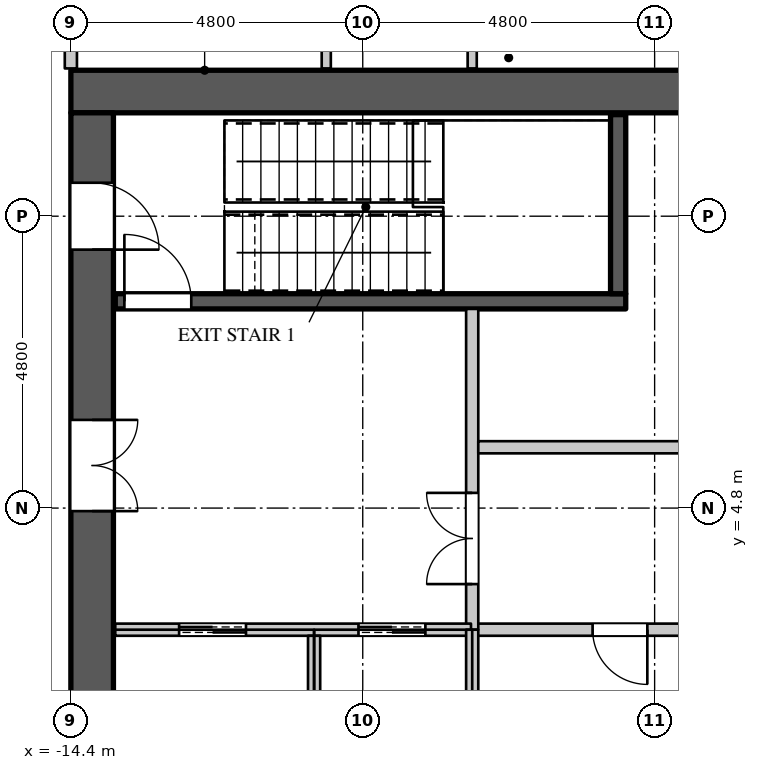
"""IFC4 building model, lengths in metres.
Left out: names, types, materials, properties, quantities, classifications, styles, units other than length and angle.
Written with IfcOpenShell. Run it as: python <this file> out.ifc"""

import sys

from ifc_helpers import new_model, si_unit, direction, frame, frame_2d, origin, place, context, subcontext, project, spatial, rectangle, extrude, element, fill, save


model = new_model("IFC4")
c1 = context("Model", 3, precision=1e-05, world=origin(), true_north=direction((0.0, 1.0)))
c2 = subcontext(c1, "Body", "Model", "MODEL_VIEW")
j1 = project(units=[si_unit("LENGTHUNIT", "METRE"), si_unit("PLANEANGLEUNIT", "RADIAN")], contexts=[c1])
p1 = place(None, origin())
s1 = spatial("IfcSite", under=j1, at=p1, CompositionType="ELEMENT")
p2 = place(p1, origin())
s2 = spatial("IfcBuilding", under=s1, at=p2, CompositionType="ELEMENT")
p3 = place(p2, frame((0.0, 0.0, 174.9)))
s3 = spatial("IfcBuildingStorey", under=s2, at=p3, CompositionType="ELEMENT", Elevation=174.9)
p4 = place(p3, frame((-14.4, 11.65, 0.0), z_axis=(0.0, 0.0, 1.0), x_axis=(1.0, 0.0, 0.0)))
e1 = element("IfcWall", 1, at=p4, inside=s3, PredefinedType="SHEAR", context=c2, shape_type="SweptSolid", body=[
    extrude(rectangle(XDim=28.8, YDim=0.7, at=frame_2d((14.4, 0.0))), origin(), (0.0, 0.0, 1.0), 4.2),
])
p5 = place(p3, frame((-14.05, -11.3, 0.0), z_axis=(0.0, 0.0, 1.0), x_axis=(0.0, 1.0, 0.0)))
e2 = element("IfcWall", 2, at=p5, inside=s3, PredefinedType="SHEAR", context=c2, shape_type="SweptSolid", body=[
    extrude(rectangle(XDim=22.6, YDim=0.7, at=frame_2d((11.3, 0.0))), origin(), (0.0, 0.0, 1.0), 4.2),
])
p6 = place(p5, frame((20.35, 0.0, 0.0)))
e3 = element("IfcOpeningElement", 3, at=p6, cuts=e2, PredefinedType="OPENING", context=c2, shape_type="SweptSolid", body=[
    extrude(rectangle(XDim=1.1, YDim=2.2, at=frame_2d((0.55, 1.1))), frame((0.0, 0.36, 0.0), z_axis=(0.0, -1.0, 0.0), x_axis=(1.0, 0.0, 0.0)), (0.0, 0.0, 1.0), 0.72),
])
p7 = place(p5, frame((1.15, 0.0, 0.0)))
e4 = element("IfcOpeningElement", 4, at=p7, cuts=e2, PredefinedType="OPENING", context=c2, shape_type="SweptSolid", body=[
    extrude(rectangle(XDim=1.1, YDim=2.2, at=frame_2d((0.55, 1.1))), frame((0.0, 0.36, 0.0), z_axis=(0.0, -1.0, 0.0), x_axis=(1.0, 0.0, 0.0)), (0.0, 0.0, 1.0), 0.72),
])
p8 = place(p5, frame((16.05, 0.0, 0.0)))
e5 = element("IfcOpeningElement", 5, at=p8, cuts=e2, PredefinedType="OPENING", context=c2, shape_type="SweptSolid", body=[
    extrude(rectangle(XDim=1.5, YDim=2.4, at=frame_2d((0.75, 1.2))), frame((0.0, 0.36, 0.0), z_axis=(0.0, -1.0, 0.0), x_axis=(1.0, 0.0, 0.0)), (0.0, 0.0, 1.0), 0.72),
])
p9 = place(p5, frame((5.05, 0.0, 0.0)))
e6 = element("IfcOpeningElement", 6, at=p9, cuts=e2, PredefinedType="OPENING", context=c2, shape_type="SweptSolid", body=[
    extrude(rectangle(XDim=1.5, YDim=2.4, at=frame_2d((0.75, 1.2))), frame((0.0, 0.36, 0.0), z_axis=(0.0, -1.0, 0.0), x_axis=(1.0, 0.0, 0.0)), (0.0, 0.0, 1.0), 0.72),
])
p10 = place(p3, frame((-14.4, 12.03, 0.0), z_axis=(0.0, 0.0, 1.0), x_axis=(0.0, 1.0, 0.0)))
e7 = element("IfcWall", 7, at=p10, inside=s3, PredefinedType="PARTITIONING", context=c2, shape_type="SweptSolid", body=[
    extrude(rectangle(XDim=2.27, YDim=0.2, at=frame_2d((1.135, 0.0))), origin(), (0.0, 0.0, 1.0), 3.95),
])
p11 = place(p3, frame((-7.82, 2.8, 0.0), z_axis=(0.0, 0.0, 1.0), x_axis=(1.0, 0.0, 0.0)))
e8 = element("IfcWall", 8, at=p11, inside=s3, PredefinedType="PARTITIONING", context=c2, shape_type="SweptSolid", body=[
    extrude(rectangle(XDim=18.24, YDim=0.2, at=frame_2d((9.12, 0.0))), origin(), (0.0, 0.0, 1.0), 3.95),
])
p12 = place(p11, frame((2.0, 0.0, 0.0)))
e9 = element("IfcOpeningElement", 9, at=p12, cuts=e8, PredefinedType="OPENING", context=c2, shape_type="SweptSolid", body=[
    extrude(rectangle(XDim=0.9, YDim=2.2, at=frame_2d((0.45, 1.1))), frame((0.0, 0.11, 0.0), z_axis=(0.0, -1.0, 0.0), x_axis=(1.0, 0.0, 0.0)), (0.0, 0.0, 1.0), 0.22),
])
p13 = place(p11, frame((6.1, 0.0, 0.0)))
e10 = element("IfcOpeningElement", 10, at=p13, cuts=e8, PredefinedType="OPENING", context=c2, shape_type="SweptSolid", body=[
    extrude(rectangle(XDim=0.9, YDim=2.2, at=frame_2d((0.45, 1.1))), frame((0.0, 0.11, 0.0), z_axis=(0.0, -1.0, 0.0), x_axis=(1.0, 0.0, 0.0)), (0.0, 0.0, 1.0), 0.22),
])
p14 = place(p11, frame((9.35, 0.0, 0.0)))
e11 = element("IfcOpeningElement", 11, at=p14, cuts=e8, PredefinedType="OPENING", context=c2, shape_type="SweptSolid", body=[
    extrude(rectangle(XDim=0.9, YDim=2.2, at=frame_2d((0.45, 1.1))), frame((0.0, 0.11, 0.0), z_axis=(0.0, -1.0, 0.0), x_axis=(1.0, 0.0, 0.0)), (0.0, 0.0, 1.0), 0.22),
])
p15 = place(p11, frame((14.3, 0.0, 0.0)))
e12 = element("IfcOpeningElement", 12, at=p15, cuts=e8, PredefinedType="OPENING", context=c2, shape_type="SweptSolid", body=[
    extrude(rectangle(XDim=0.9, YDim=2.2, at=frame_2d((0.45, 1.1))), frame((0.0, 0.11, 0.0), z_axis=(0.0, -1.0, 0.0), x_axis=(1.0, 0.0, 0.0)), (0.0, 0.0, 1.0), 0.22),
])
p16 = place(p3, frame((-7.8, 2.8, 0.0), z_axis=(0.0, 0.0, 1.0), x_axis=(0.0, 1.0, 0.0)))
e13 = element("IfcWall", 13, at=p16, inside=s3, PredefinedType="PARTITIONING", context=c2, shape_type="SweptSolid", body=[
    extrude(rectangle(XDim=5.275, YDim=0.2, at=frame_2d((2.637, 0.0))), origin(), (0.0, 0.0, 1.0), 3.95),
])
p17 = place(p16, frame((0.75, 0.0, 0.0)))
e14 = element("IfcOpeningElement", 14, at=p17, cuts=e13, PredefinedType="OPENING", context=c2, shape_type="SweptSolid", body=[
    extrude(rectangle(XDim=1.5, YDim=2.4, at=frame_2d((0.75, 1.2))), frame((0.0, 0.11, 0.0), z_axis=(0.0, -1.0, 0.0), x_axis=(1.0, 0.0, 0.0)), (0.0, 0.0, 1.0), 0.22),
])
p18 = place(p3, frame((-7.7, 5.8, 0.0), z_axis=(0.0, 0.0, 1.0), x_axis=(1.0, 0.0, 0.0)))
e15 = element("IfcWall", 15, at=p18, inside=s3, PredefinedType="PARTITIONING", context=c2, shape_type="SweptSolid", body=[
    extrude(rectangle(XDim=11.52, YDim=0.2, at=frame_2d((5.76, 0.0))), origin(), (0.0, 0.0, 1.0), 3.95),
])
p19 = place(p18, frame((5.3, 0.0, 0.0)))
e16 = element("IfcOpeningElement", 16, at=p19, cuts=e15, PredefinedType="OPENING", context=c2, shape_type="SweptSolid", body=[
    extrude(rectangle(XDim=0.9, YDim=2.2, at=frame_2d((0.45, 1.1))), frame((0.0, 0.11, 0.0), z_axis=(0.0, -1.0, 0.0), x_axis=(1.0, 0.0, 0.0)), (0.0, 0.0, 1.0), 0.22),
])
p20 = place(p3, frame((-10.2, 12.03, 0.0), z_axis=(0.0, 0.0, 1.0), x_axis=(0.0, 1.0, 0.0)))
e17 = element("IfcWall", 17, at=p20, inside=s3, PredefinedType="PARTITIONING", context=c2, shape_type="SweptSolid", body=[
    extrude(rectangle(XDim=4.245, YDim=0.15, at=frame_2d((2.123, 0.0))), origin(), (0.0, 0.0, 1.0), 3.95),
])
p21 = place(p20, frame((1.6, 0.0, 0.0)))
e18 = element("IfcOpeningElement", 18, at=p21, cuts=e17, PredefinedType="OPENING", context=c2, shape_type="SweptSolid", body=[
    extrude(rectangle(XDim=0.95, YDim=2.2, at=frame_2d((0.475, 1.1))), frame((0.0, 0.085, 0.0), z_axis=(0.0, -1.0, 0.0), x_axis=(1.0, 0.0, 0.0)), (0.0, 0.0, 1.0), 0.17),
])
p22 = place(p3, frame((-7.8, 12.03, 0.0), z_axis=(0.0, 0.0, 1.0), x_axis=(0.0, 1.0, 0.0)))
e19 = element("IfcWall", 19, at=p22, inside=s3, PredefinedType="PARTITIONING", context=c2, shape_type="SweptSolid", body=[
    extrude(rectangle(XDim=4.695, YDim=0.15, at=frame_2d((2.348, 0.0))), origin(), (0.0, 0.0, 1.0), 3.95),
])
p23 = place(p3, frame((-13.67, 2.8, 0.0), z_axis=(0.0, 0.0, 1.0), x_axis=(1.0, 0.0, 0.0)))
e20 = element("IfcWall", 20, at=p23, inside=s3, PredefinedType="PARTITIONING", context=c2, shape_type="SweptSolid", body=[
    extrude(rectangle(XDim=5.85, YDim=0.2, at=frame_2d((2.925, 0.0))), origin(), (0.0, 0.0, 1.0), 3.95),
])
p24 = place(p23, frame((1.05, 0.0, 0.0)))
e21 = element("IfcOpeningElement", 21, at=p24, cuts=e20, PredefinedType="OPENING", context=c2, shape_type="SweptSolid", body=[
    extrude(rectangle(XDim=1.1, YDim=2.2, at=frame_2d((0.55, 1.1))), frame((0.0, 0.11, 0.0), z_axis=(0.0, -1.0, 0.0), x_axis=(1.0, 0.0, 0.0)), (0.0, 0.0, 1.0), 0.22),
])
p25 = place(p23, frame((4.0, 0.0, 0.0)))
e22 = element("IfcOpeningElement", 22, at=p25, cuts=e20, PredefinedType="OPENING", context=c2, shape_type="SweptSolid", body=[
    extrude(rectangle(XDim=1.1, YDim=2.2, at=frame_2d((0.55, 1.1))), frame((0.0, 0.11, 0.0), z_axis=(0.0, -1.0, 0.0), x_axis=(1.0, 0.0, 0.0)), (0.0, 0.0, 1.0), 0.22),
])
p26 = place(p3, frame((-10.4, 0.0, 0.0), z_axis=(0.0, 0.0, 1.0), x_axis=(0.0, 1.0, 0.0)))
e23 = element("IfcWall", 23, at=p26, inside=s3, PredefinedType="PARTITIONING", context=c2, shape_type="SweptSolid", body=[
    extrude(rectangle(XDim=2.7, YDim=0.2, at=frame_2d((1.35, 0.0))), origin(), (0.0, 0.0, 1.0), 3.95),
])
p27 = place(p3, frame((-7.8, 0.0, 0.0), z_axis=(0.0, 0.0, 1.0), x_axis=(0.0, 1.0, 0.0)))
e24 = element("IfcWall", 24, at=p27, inside=s3, PredefinedType="PARTITIONING", context=c2, shape_type="SweptSolid", body=[
    extrude(rectangle(XDim=2.8, YDim=0.2, at=frame_2d((1.4, 0.0))), origin(), (0.0, 0.0, 1.0), 3.95),
])
p28 = place(p3, frame((-13.67, 8.2, 0.0), z_axis=(0.0, 0.0, 1.0), x_axis=(1.0, 0.0, 0.0)))
e25 = element("IfcWall", 25, at=p28, inside=s3, PredefinedType="SHEAR", context=c2, shape_type="SweptSolid", body=[
    extrude(rectangle(XDim=8.395, YDim=0.25, at=frame_2d((4.198, 0.0))), origin(), (0.0, 0.0, 1.0), 3.95),
])
p29 = place(p28, frame((0.15, 0.0, 0.0)))
e26 = element("IfcOpeningElement", 26, at=p29, cuts=e25, PredefinedType="OPENING", context=c2, shape_type="SweptSolid", body=[
    extrude(rectangle(XDim=1.1, YDim=2.2, at=frame_2d((0.55, 1.1))), frame((0.0, 0.135, 0.0), z_axis=(0.0, -1.0, 0.0), x_axis=(1.0, 0.0, 0.0)), (0.0, 0.0, 1.0), 0.27),
])
p30 = place(p3, frame((-5.4, 8.325, 0.0), z_axis=(0.0, 0.0, 1.0), x_axis=(0.0, 1.0, 0.0)))
e27 = element("IfcWall", 27, at=p30, inside=s3, PredefinedType="SHEAR", context=c2, shape_type="SweptSolid", body=[
    extrude(rectangle(XDim=2.945, YDim=0.25, at=frame_2d((1.473, 0.0))), origin(), (0.0, 0.0, 1.0), 3.95),
])
p31 = place(p12, origin())
e28 = element("IfcDoor", 28, at=p31, inside=s3, OperationType="SINGLE_SWING_LEFT", PredefinedType="DOOR", context=c2, shape_type="SweptSolid", body=[
    extrude(rectangle(XDim=0.9, YDim=2.2, at=frame_2d((0.45, 1.1))), frame((0.0, 0.025, 0.0), z_axis=(0.0, -1.0, 0.0), x_axis=(1.0, 0.0, 0.0)), (0.0, 0.0, 1.0), 0.05),
])
fill(e9, e28)
p32 = place(p24, origin())
e29 = element("IfcDoor", 29, at=p32, inside=s3, OperationType="DOUBLE_DOOR_SLIDING", PredefinedType="DOOR", context=c2, shape_type="SweptSolid", body=[
    extrude(rectangle(XDim=1.1, YDim=2.2, at=frame_2d((0.55, 1.1))), frame((0.0, 0.025, 0.0), z_axis=(0.0, -1.0, 0.0), x_axis=(1.0, 0.0, 0.0)), (0.0, 0.0, 1.0), 0.05),
])
fill(e21, e29)
p33 = place(p25, origin())
e30 = element("IfcDoor", 30, at=p33, inside=s3, OperationType="DOUBLE_DOOR_SLIDING", PredefinedType="DOOR", context=c2, shape_type="SweptSolid", body=[
    extrude(rectangle(XDim=1.1, YDim=2.2, at=frame_2d((0.55, 1.1))), frame((0.0, 0.025, 0.0), z_axis=(0.0, -1.0, 0.0), x_axis=(1.0, 0.0, 0.0)), (0.0, 0.0, 1.0), 0.05),
])
fill(e22, e30)
p34 = place(p29, origin())
e31 = element("IfcDoor", 31, at=p34, inside=s3, OperationType="SINGLE_SWING_LEFT", PredefinedType="DOOR", context=c2, shape_type="SweptSolid", body=[
    extrude(rectangle(XDim=1.1, YDim=2.2, at=frame_2d((0.55, 1.1))), frame((0.0, 0.025, 0.0), z_axis=(0.0, -1.0, 0.0), x_axis=(1.0, 0.0, 0.0)), (0.0, 0.0, 1.0), 0.05),
])
fill(e26, e31)
p35 = place(p17, origin())
e32 = element("IfcDoor", 32, at=p35, inside=s3, OperationType="DOUBLE_DOOR_SINGLE_SWING", PredefinedType="DOOR", context=c2, shape_type="SweptSolid", body=[
    extrude(rectangle(XDim=1.5, YDim=2.4, at=frame_2d((0.75, 1.2))), frame((0.0, 0.025, 0.0), z_axis=(0.0, -1.0, 0.0), x_axis=(1.0, 0.0, 0.0)), (0.0, 0.0, 1.0), 0.05),
])
fill(e14, e32)
p36 = place(p6, origin())
e33 = element("IfcDoor", 33, at=p36, inside=s3, OperationType="SINGLE_SWING_RIGHT", PredefinedType="DOOR", context=c2, shape_type="SweptSolid", body=[
    extrude(rectangle(XDim=1.1, YDim=2.2, at=frame_2d((0.55, 1.1))), frame((0.0, -0.295, 0.0), z_axis=(0.0, -1.0, 0.0), x_axis=(1.0, 0.0, 0.0)), (0.0, 0.0, 1.0), 0.05),
])
fill(e3, e33)
p37 = place(p8, origin())
e34 = element("IfcDoor", 34, at=p37, inside=s3, OperationType="DOUBLE_DOOR_SINGLE_SWING", PredefinedType="DOOR", context=c2, shape_type="SweptSolid", body=[
    extrude(rectangle(XDim=1.5, YDim=2.4, at=frame_2d((0.75, 1.2))), frame((0.0, -0.295, 0.0), z_axis=(0.0, -1.0, 0.0), x_axis=(1.0, 0.0, 0.0)), (0.0, 0.0, 1.0), 0.05),
])
fill(e5, e34)
save(model, sys.argv[1])
